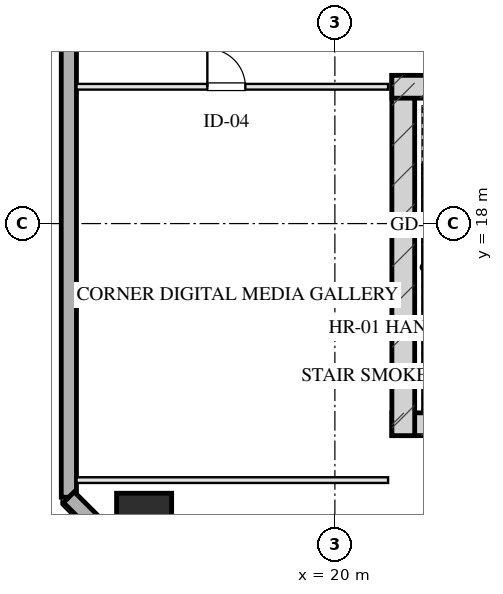
"""IFC4 building model, lengths in metres.
Left out: names, types, materials, properties, quantities, classifications, styles, units other than length and angle.
Written with IfcOpenShell. Run it as: python <this file> out.ifc"""

import sys

from ifc_helpers import new_model, si_unit, direction, frame, frame_2d, origin, origin_2d, place, context, subcontext, project, spatial, rectangle, hollow_rectangle, extrude, element, fill, save


model = new_model("IFC4")
c1 = context("Model", 3, precision=1e-05, world=origin(), true_north=direction((0.0, 1.0)))
c2 = subcontext(c1, "Body", "Model", "MODEL_VIEW")
j1 = project(units=[si_unit("LENGTHUNIT", "METRE"), si_unit("PLANEANGLEUNIT", "RADIAN")], contexts=[c1])
p1 = place(None, origin())
s1 = spatial("IfcSite", under=j1, at=p1, CompositionType="ELEMENT")
p2 = place(p1, origin())
s2 = spatial("IfcBuilding", under=s1, at=p2, CompositionType="ELEMENT")
p3 = place(p2, frame((0.0, 0.0, 180.55)))
s3 = spatial("IfcBuildingStorey", under=s2, at=p3, CompositionType="ELEMENT", Elevation=180.55)
p4 = place(p3, frame((21.5, 12.72, 0.0), z_axis=(0.0, 0.0, 1.0), x_axis=(1.0, 0.0, 0.0)))
e1 = element("IfcWall", 1, at=p4, inside=s3, PredefinedType="SHEAR", context=c2, shape_type="SweptSolid", body=[
    extrude(rectangle(XDim=17.0, YDim=0.6, at=frame_2d((8.5, 0.0))), origin(), (0.0, 0.0, 1.0), 3.45),
])
p5 = place(p3, frame((21.8, 21.9, 0.0), z_axis=(0.0, 0.0, 1.0), x_axis=(0.0, -1.0, 0.0)))
e2 = element("IfcWall", 2, at=p5, inside=s3, PredefinedType="SHEAR", context=c2, shape_type="SweptSolid", body=[
    extrude(rectangle(XDim=9.48, YDim=0.6, at=frame_2d((4.74, 0.0))), origin(), (0.0, 0.0, 1.0), 3.45),
])
p6 = place(p3, frame((21.5, 21.6, 0.0), z_axis=(0.0, 0.0, 1.0), x_axis=(1.0, 0.0, 0.0)))
e3 = element("IfcWall", 3, at=p6, inside=s3, PredefinedType="SHEAR", context=c2, shape_type="SweptSolid", body=[
    extrude(rectangle(XDim=4.22, YDim=0.6, at=frame_2d((2.11, 0.0))), origin(), (0.0, 0.0, 1.0), 3.45),
])
p7 = place(p3, frame((14.98, 10.18, 0.0), z_axis=(0.0, 0.0, 1.0), x_axis=(1.0, 0.0, 0.0)))
e4 = element("IfcColumn", 4, at=p7, inside=s3, PredefinedType="COLUMN", context=c2, shape_type="SweptSolid", body=[
    extrude(hollow_rectangle(XDim=1.45, YDim=1.45, WallThickness=0.05, at=origin_2d()), origin(), (0.0, 0.0, 1.0), 3.451),
])
p8 = place(p3, frame((13.0, 10.8, 0.0), z_axis=(0.0, 0.0, 1.0), x_axis=(0.0, 1.0, 0.0)))
e5 = element("IfcWall", 5, at=p8, inside=s3, PredefinedType="SOLIDWALL", context=c2, shape_type="SweptSolid", body=[
    extrude(rectangle(XDim=46.4, YDim=0.4, at=frame_2d((23.2, 0.0))), origin(), (0.0, 0.0, 1.0), 2.55),
])
p9 = place(p8, frame((15.75, 0.0, 0.75)))
e6 = element("IfcOpeningElement", 6, at=p9, cuts=e5, PredefinedType="OPENING", context=c2, shape_type="SweptSolid", body=[
    extrude(rectangle(XDim=2.1, YDim=1.4, at=frame_2d((1.05, 0.7))), frame((0.0, 0.21, 0.0), z_axis=(0.0, -1.0, 0.0), x_axis=(1.0, 0.0, 0.0)), (0.0, 0.0, 1.0), 0.42),
])
p10 = place(p8, frame((19.55, 0.0, 0.75)))
e7 = element("IfcOpeningElement", 7, at=p10, cuts=e5, PredefinedType="OPENING", context=c2, shape_type="SweptSolid", body=[
    extrude(rectangle(XDim=2.1, YDim=1.4, at=frame_2d((1.05, 0.7))), frame((0.0, 0.21, 0.0), z_axis=(0.0, -1.0, 0.0), x_axis=(1.0, 0.0, 0.0)), (0.0, 0.0, 1.0), 0.42),
])
p11 = place(p8, frame((24.75, 0.0, 0.75)))
e8 = element("IfcOpeningElement", 8, at=p11, cuts=e5, PredefinedType="OPENING", context=c2, shape_type="SweptSolid", body=[
    extrude(rectangle(XDim=2.1, YDim=1.4, at=frame_2d((1.05, 0.7))), frame((0.0, 0.21, 0.0), z_axis=(0.0, -1.0, 0.0), x_axis=(1.0, 0.0, 0.0)), (0.0, 0.0, 1.0), 0.42),
])
p12 = place(p8, frame((28.55, 0.0, 0.75)))
e9 = element("IfcOpeningElement", 9, at=p12, cuts=e5, PredefinedType="OPENING", context=c2, shape_type="SweptSolid", body=[
    extrude(rectangle(XDim=2.1, YDim=1.4, at=frame_2d((1.05, 0.7))), frame((0.0, 0.21, 0.0), z_axis=(0.0, -1.0, 0.0), x_axis=(1.0, 0.0, 0.0)), (0.0, 0.0, 1.0), 0.42),
])
p13 = place(p3, frame((15.6, 8.2, 0.0), z_axis=(0.0, 0.0, 1.0), x_axis=(-0.707106781187, 0.707106781187, 0.0)))
e10 = element("IfcWall", 10, at=p13, inside=s3, PredefinedType="SOLIDWALL", context=c2, shape_type="SweptSolid", body=[
    extrude(rectangle(XDim=3.677, YDim=0.4, at=frame_2d((1.838, 0.0))), origin(), (0.0, 0.0, 1.0), 2.55),
])
p14 = place(p3, frame((13.2, 11.25, 0.0), z_axis=(0.0, 0.0, 1.0), x_axis=(1.0, 0.0, 0.0)))
e11 = element("IfcWall", 11, at=p14, inside=s3, PredefinedType="PARTITIONING", context=c2, shape_type="SweptSolid", body=[
    extrude(rectangle(XDim=8.2, YDim=0.15, at=frame_2d((4.1, 0.0))), origin(), (0.0, 0.0, 1.0), 3.155),
])
p15 = place(p3, frame((13.2, 21.6, 0.0), z_axis=(0.0, 0.0, 1.0), x_axis=(1.0, 0.0, 0.0)))
e12 = element("IfcWall", 12, at=p15, inside=s3, PredefinedType="PARTITIONING", context=c2, shape_type="SweptSolid", body=[
    extrude(rectangle(XDim=8.2, YDim=0.15, at=frame_2d((4.1, 0.0))), origin(), (0.0, 0.0, 1.0), 3.155),
])
p16 = place(p15, frame((3.444, 0.0, 0.0)))
e13 = element("IfcOpeningElement", 13, at=p16, cuts=e12, PredefinedType="OPENING", context=c2, shape_type="SweptSolid", body=[
    extrude(rectangle(XDim=1.0, YDim=2.05, at=frame_2d((0.5, 1.025))), frame((0.0, 0.085, 0.0), z_axis=(0.0, -1.0, 0.0), x_axis=(1.0, 0.0, 0.0)), (0.0, 0.0, 1.0), 0.17),
])
p17 = place(p16, origin())
e14 = element("IfcDoor", 14, at=p17, inside=s3, OperationType="SINGLE_SWING_LEFT", PredefinedType="DOOR", context=c2, shape_type="SweptSolid", body=[
    extrude(rectangle(XDim=1.0, YDim=2.05, at=frame_2d((0.5, 1.025))), frame((0.0, 0.025, 0.0), z_axis=(0.0, -1.0, 0.0), x_axis=(1.0, 0.0, 0.0)), (0.0, 0.0, 1.0), 0.05),
])
fill(e13, e14)
save(model, sys.argv[1])
